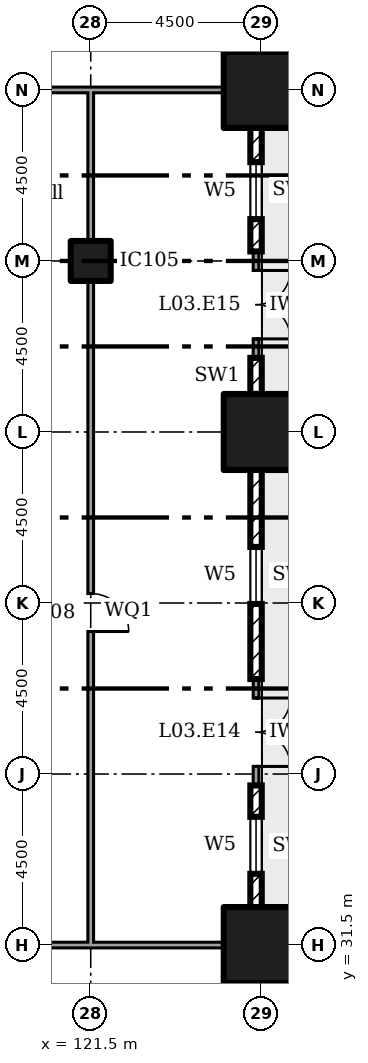
"""IFC4 building model, lengths in metres.
Left out: names, types, materials, properties, quantities, classifications, styles, units other than length and angle.
Written with IfcOpenShell. Run it as: python <this file> out.ifc"""

import sys

from ifc_helpers import new_model, si_unit, direction, frame, frame_2d, origin, origin_2d, place, context, subcontext, project, spatial, rectangle, extrude, element, fill, save


model = new_model("IFC4")
c1 = context("Model", 3, precision=1e-05, world=origin(), true_north=direction((0.0, 1.0)))
c2 = subcontext(c1, "Body", "Model", "MODEL_VIEW")
j1 = project(units=[si_unit("LENGTHUNIT", "METRE"), si_unit("PLANEANGLEUNIT", "RADIAN")], contexts=[c1])
p1 = place(None, origin())
s1 = spatial("IfcSite", under=j1, at=p1, CompositionType="ELEMENT")
p2 = place(p1, origin())
s2 = spatial("IfcBuilding", under=s1, at=p2, CompositionType="ELEMENT")
p3 = place(p2, frame((0.0, 0.0, 16.5)))
s3 = spatial("IfcBuildingStorey", under=s2, at=p3, CompositionType="ELEMENT", Elevation=16.5)
for number, where in (
    (1, (126.0, 31.5, 0.0)),
    (2, (126.0, 45.0, 0.0)),
    (3, (126.0, 54.0, 0.0)),
):
    element("IfcColumn", number, at=place(p3, frame(where)), inside=s3, PredefinedType="COLUMN", context=c2, shape_type="SweptSolid", body=[
        extrude(rectangle(XDim=2.0, YDim=2.0, at=origin_2d()), origin(), (0.0, 0.0, 1.0), 4.5),
    ])
p4 = place(p3, frame((121.5, 49.5, 0.0)))
e4 = element("IfcColumn", 4, at=p4, inside=s3, PredefinedType="COLUMN", context=c2, shape_type="SweptSolid", body=[
    extrude(rectangle(XDim=1.05, YDim=1.05, at=origin_2d()), origin(), (0.0, 0.0, 1.0), 4.5),
])
p5 = place(p3, frame((125.85, 32.5, 0.0), z_axis=(0.0, 0.0, 1.0), x_axis=(0.0, 1.0, 0.0)))
e5 = element("IfcWall", 5, at=p5, inside=s3, PredefinedType="ELEMENTEDWALL", context=c2, shape_type="SweptSolid", body=[
    extrude(rectangle(XDim=3.2, YDim=0.3, at=frame_2d((1.6, 0.0))), origin(), (0.0, 0.0, 1.0), 2.25),
])
p6 = place(p5, frame((0.875, 0.0, 0.9)))
e6 = element("IfcOpeningElement", 6, at=p6, cuts=e5, PredefinedType="OPENING", context=c2, shape_type="SweptSolid", body=[
    extrude(rectangle(XDim=1.5, YDim=1.25, at=frame_2d((0.75, 0.625))), frame((0.0, 0.16, 0.0), z_axis=(0.0, -1.0, 0.0), x_axis=(1.0, 0.0, 0.0)), (0.0, 0.0, 1.0), 0.32),
])
p7 = place(p3, frame((125.85, 35.7, 0.0), z_axis=(0.0, 0.0, 1.0), x_axis=(0.0, 1.0, 0.0)))
e7 = element("IfcWall", 7, at=p7, inside=s3, PredefinedType="SOLIDWALL", context=c2, shape_type="SweptSolid", body=[
    extrude(rectangle(XDim=2.8, YDim=0.15, at=frame_2d((1.4, 0.0))), origin(), (0.0, 0.0, 1.0), 2.25),
])
p8 = place(p7, frame((0.5, 0.0, 0.0)))
e8 = element("IfcOpeningElement", 8, at=p8, cuts=e7, PredefinedType="OPENING", context=c2, shape_type="SweptSolid", body=[
    extrude(rectangle(XDim=1.8, YDim=2.1, at=frame_2d((0.9, 1.05))), frame((0.0, 0.085, 0.0), z_axis=(0.0, -1.0, 0.0), x_axis=(1.0, 0.0, 0.0)), (0.0, 0.0, 1.0), 0.17),
])
p9 = place(p3, frame((125.85, 38.5, 0.0), z_axis=(0.0, 0.0, 1.0), x_axis=(0.0, 1.0, 0.0)))
e9 = element("IfcWall", 9, at=p9, inside=s3, PredefinedType="ELEMENTEDWALL", context=c2, shape_type="SweptSolid", body=[
    extrude(rectangle(XDim=5.5, YDim=0.3, at=frame_2d((2.75, 0.0))), origin(), (0.0, 0.0, 1.0), 2.25),
])
p10 = place(p9, frame((1.975, 0.0, 0.9)))
e10 = element("IfcOpeningElement", 10, at=p10, cuts=e9, PredefinedType="OPENING", context=c2, shape_type="SweptSolid", body=[
    extrude(rectangle(XDim=1.5, YDim=1.25, at=frame_2d((0.75, 0.625))), frame((0.0, 0.16, 0.0), z_axis=(0.0, -1.0, 0.0), x_axis=(1.0, 0.0, 0.0)), (0.0, 0.0, 1.0), 0.32),
])
p11 = place(p3, frame((125.85, 46.0, 0.0), z_axis=(0.0, 0.0, 1.0), x_axis=(0.0, 1.0, 0.0)))
e11 = element("IfcWall", 11, at=p11, inside=s3, PredefinedType="ELEMENTEDWALL", context=c2, shape_type="SweptSolid", body=[
    extrude(rectangle(XDim=0.95, YDim=0.3, at=frame_2d((0.475, 0.0))), origin(), (0.0, 0.0, 1.0), 2.25),
])
p12 = place(p3, frame((125.85, 46.95, 0.0), z_axis=(0.0, 0.0, 1.0), x_axis=(0.0, 1.0, 0.0)))
e12 = element("IfcWall", 12, at=p12, inside=s3, PredefinedType="SOLIDWALL", context=c2, shape_type="SweptSolid", body=[
    extrude(rectangle(XDim=2.8, YDim=0.15, at=frame_2d((1.4, 0.0))), origin(), (0.0, 0.0, 1.0), 2.25),
])
p13 = place(p12, frame((0.5, 0.0, 0.0)))
e13 = element("IfcOpeningElement", 13, at=p13, cuts=e12, PredefinedType="OPENING", context=c2, shape_type="SweptSolid", body=[
    extrude(rectangle(XDim=1.8, YDim=2.1, at=frame_2d((0.9, 1.05))), frame((0.0, 0.085, 0.0), z_axis=(0.0, -1.0, 0.0), x_axis=(1.0, 0.0, 0.0)), (0.0, 0.0, 1.0), 0.17),
])
p14 = place(p3, frame((125.85, 49.75, 0.0), z_axis=(0.0, 0.0, 1.0), x_axis=(0.0, 1.0, 0.0)))
e14 = element("IfcWall", 14, at=p14, inside=s3, PredefinedType="ELEMENTEDWALL", context=c2, shape_type="SweptSolid", body=[
    extrude(rectangle(XDim=3.25, YDim=0.3, at=frame_2d((1.625, 0.0))), origin(), (0.0, 0.0, 1.0), 2.25),
])
p15 = place(p14, frame((0.85, 0.0, 0.9)))
e15 = element("IfcOpeningElement", 15, at=p15, cuts=e14, PredefinedType="OPENING", context=c2, shape_type="SweptSolid", body=[
    extrude(rectangle(XDim=1.5, YDim=1.25, at=frame_2d((0.75, 0.625))), frame((0.0, 0.16, 0.0), z_axis=(0.0, -1.0, 0.0), x_axis=(1.0, 0.0, 0.0)), (0.0, 0.0, 1.0), 0.32),
])
p16 = place(p3, frame((117.52, 31.5, 0.0)))
e16 = element("IfcWall", 16, at=p16, inside=s3, PredefinedType="PARTITIONING", context=c2, shape_type="SweptSolid", body=[
    extrude(rectangle(XDim=4.055, YDim=0.15, at=frame_2d((2.027, 0.0))), origin(), (0.0, 0.0, 1.0), 4.05),
])
p17 = place(p3, frame((121.5, 31.575, 0.0), z_axis=(0.0, 0.0, 1.0), x_axis=(0.0, 1.0, 0.0)))
e17 = element("IfcWall", 17, at=p17, inside=s3, PredefinedType="PARTITIONING", context=c2, shape_type="SweptSolid", body=[
    extrude(rectangle(XDim=17.405, YDim=0.15, at=frame_2d((8.703, 0.0))), origin(), (0.0, 0.0, 1.0), 4.05),
])
p18 = place(p17, frame((8.175, 0.0, 0.0)))
e18 = element("IfcOpeningElement", 18, at=p18, cuts=e17, PredefinedType="OPENING", context=c2, shape_type="SweptSolid", body=[
    extrude(rectangle(XDim=1.0, YDim=2.1, at=frame_2d((0.5, 1.05))), frame((0.0, 0.085, 0.0), z_axis=(0.0, -1.0, 0.0), x_axis=(1.0, 0.0, 0.0)), (0.0, 0.0, 1.0), 0.17),
])
p19 = place(p3, frame((121.5, 50.02, 0.0), z_axis=(0.0, 0.0, 1.0), x_axis=(0.0, 1.0, 0.0)))
e19 = element("IfcWall", 19, at=p19, inside=s3, PredefinedType="PARTITIONING", context=c2, shape_type="SweptSolid", body=[
    extrude(rectangle(XDim=4.055, YDim=0.15, at=frame_2d((2.027, 0.0))), origin(), (0.0, 0.0, 1.0), 4.05),
])
p20 = place(p3, frame((104.02, 54.0, 0.0)))
e20 = element("IfcWall", 20, at=p20, inside=s3, PredefinedType="PARTITIONING", context=c2, shape_type="SweptSolid", body=[
    extrude(rectangle(XDim=17.48, YDim=0.15, at=frame_2d((8.74, 0.0))), origin(), (0.0, 0.0, 1.0), 4.05),
])
p21 = place(p20, frame((8.25, 0.0, 0.0)))
e21 = element("IfcOpeningElement", 21, at=p21, cuts=e20, PredefinedType="OPENING", context=c2, shape_type="SweptSolid", body=[
    extrude(rectangle(XDim=1.0, YDim=2.1, at=frame_2d((0.5, 1.05))), frame((0.0, 0.085, 0.0), z_axis=(0.0, -1.0, 0.0), x_axis=(1.0, 0.0, 0.0)), (0.0, 0.0, 1.0), 0.17),
])
p22 = place(p3, frame((121.5, 31.5, 0.0)))
e22 = element("IfcWall", 22, at=p22, inside=s3, PredefinedType="PARTITIONING", context=c2, shape_type="SweptSolid", body=[
    extrude(rectangle(XDim=3.505, YDim=0.15, at=frame_2d((1.752, 0.0))), origin(), (0.0, 0.0, 1.0), 4.05),
])
p23 = place(p3, frame((121.575, 54.0, 0.0)))
e23 = element("IfcWall", 23, at=p23, inside=s3, PredefinedType="PARTITIONING", context=c2, shape_type="SweptSolid", body=[
    extrude(rectangle(XDim=3.43, YDim=0.15, at=frame_2d((1.715, 0.0))), origin(), (0.0, 0.0, 1.0), 4.05),
])
p24 = place(p6, origin())
e24 = element("IfcWindow", 24, at=p24, inside=s3, PartitioningType="SINGLE_PANEL", PredefinedType="WINDOW", context=c2, shape_type="SweptSolid", body=[
    extrude(rectangle(XDim=1.5, YDim=1.25, at=frame_2d((0.75, 0.625))), frame((0.0, 0.03, 0.0), z_axis=(0.0, -1.0, 0.0), x_axis=(1.0, 0.0, 0.0)), (0.0, 0.0, 1.0), 0.06),
])
fill(e6, e24)
p25 = place(p8, frame((1.8, 0.0, 0.0), x_axis=(-1.0, 0.0, 0.0)))
e25 = element("IfcDoor", 25, at=p25, inside=s3, OperationType="DOUBLE_DOOR_DOUBLE_SWING", PredefinedType="NOTDEFINED", context=c2, shape_type="SweptSolid", body=[
    extrude(rectangle(XDim=1.8, YDim=2.1, at=frame_2d((0.9, 1.05))), frame((0.0, 0.025, 0.0), z_axis=(0.0, -1.0, 0.0), x_axis=(1.0, 0.0, 0.0)), (0.0, 0.0, 1.0), 0.05),
])
fill(e8, e25)
p26 = place(p10, origin())
e26 = element("IfcWindow", 26, at=p26, inside=s3, PartitioningType="SINGLE_PANEL", PredefinedType="WINDOW", context=c2, shape_type="SweptSolid", body=[
    extrude(rectangle(XDim=1.5, YDim=1.25, at=frame_2d((0.75, 0.625))), frame((0.0, 0.03, 0.0), z_axis=(0.0, -1.0, 0.0), x_axis=(1.0, 0.0, 0.0)), (0.0, 0.0, 1.0), 0.06),
])
fill(e10, e26)
p27 = place(p13, frame((1.8, 0.0, 0.0), x_axis=(-1.0, 0.0, 0.0)))
e27 = element("IfcDoor", 27, at=p27, inside=s3, OperationType="DOUBLE_DOOR_DOUBLE_SWING", PredefinedType="NOTDEFINED", context=c2, shape_type="SweptSolid", body=[
    extrude(rectangle(XDim=1.8, YDim=2.1, at=frame_2d((0.9, 1.05))), frame((0.0, 0.025, 0.0), z_axis=(0.0, -1.0, 0.0), x_axis=(1.0, 0.0, 0.0)), (0.0, 0.0, 1.0), 0.05),
])
fill(e13, e27)
p28 = place(p15, origin())
e28 = element("IfcWindow", 28, at=p28, inside=s3, PartitioningType="SINGLE_PANEL", PredefinedType="WINDOW", context=c2, shape_type="SweptSolid", body=[
    extrude(rectangle(XDim=1.5, YDim=1.25, at=frame_2d((0.75, 0.625))), frame((0.0, 0.03, 0.0), z_axis=(0.0, -1.0, 0.0), x_axis=(1.0, 0.0, 0.0)), (0.0, 0.0, 1.0), 0.06),
])
fill(e15, e28)
p29 = place(p18, frame((1.0, 0.0, 0.0), x_axis=(-1.0, 0.0, 0.0)))
e29 = element("IfcDoor", 29, at=p29, inside=s3, OperationType="SINGLE_SWING_LEFT", PredefinedType="DOOR", context=c2, shape_type="SweptSolid", body=[
    extrude(rectangle(XDim=1.0, YDim=2.1, at=frame_2d((0.5, 1.05))), frame((0.0, 0.025, 0.0), z_axis=(0.0, -1.0, 0.0), x_axis=(1.0, 0.0, 0.0)), (0.0, 0.0, 1.0), 0.05),
])
fill(e18, e29)
save(model, sys.argv[1])
